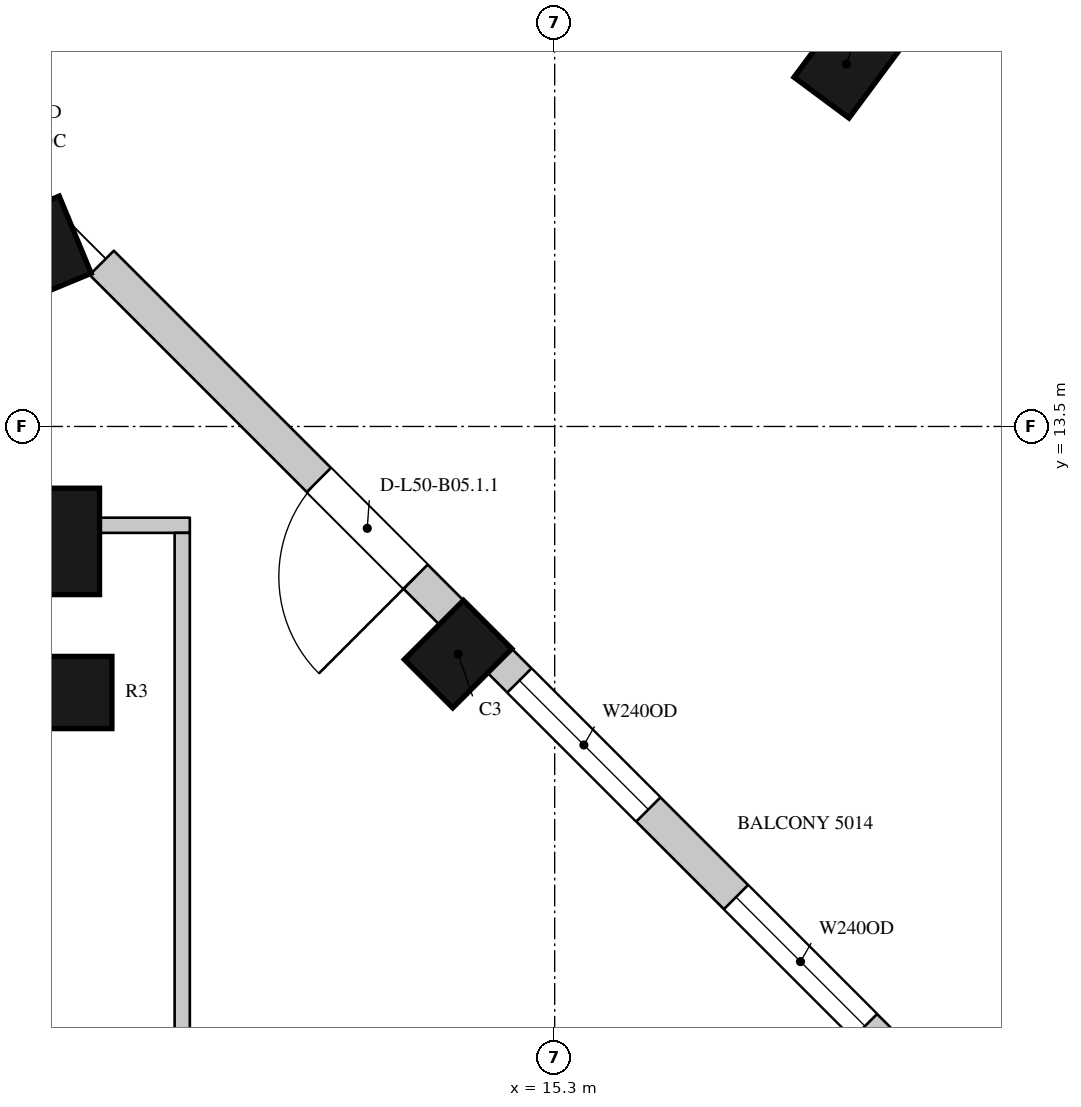
"""IFC4 building model, lengths in metres.
Left out: names, types, materials, properties, quantities, classifications, styles, units other than length and angle.
Written with IfcOpenShell. Run it as: python <this file> out.ifc"""

import sys

from ifc_helpers import new_model, si_unit, direction, frame, frame_2d, origin, origin_2d, place, context, subcontext, project, spatial, rectangle, circle, extrude, element, fill, save


model = new_model("IFC4")
c1 = context("Model", 3, precision=1e-05, world=origin(), true_north=direction((0.0, 1.0)))
c2 = subcontext(c1, "Body", "Model", "MODEL_VIEW")
j1 = project(units=[si_unit("LENGTHUNIT", "METRE"), si_unit("PLANEANGLEUNIT", "RADIAN")], contexts=[c1])
p1 = place(None, origin())
s1 = spatial("IfcSite", under=j1, at=p1, CompositionType="ELEMENT")
p2 = place(p1, origin())
s2 = spatial("IfcBuilding", under=s1, at=p2, CompositionType="ELEMENT")
p3 = place(p2, frame((0.0, 0.0, 226.1)))
s3 = spatial("IfcBuildingStorey", under=s2, at=p3, CompositionType="ELEMENT", Elevation=226.1)
for number, where, z_axis, x_axis in (
    (1, (14.029, 10.505, 0.0), (0.0, 0.0, 1.0), (-0.707, 0.707, 0.0)),
    (2, (8.576, 15.85, 0.0), (0.0, 0.0, 1.0), (-0.924, -0.383, 0.0)),
):
    element("IfcColumn", number, at=place(p3, frame(where, z_axis=z_axis, x_axis=x_axis)), inside=s3, PredefinedType="COLUMN", context=c2, shape_type="SweptSolid", body=[
        extrude(rectangle(XDim=0.9, YDim=1.1, at=origin_2d()), origin(), (0.0, 0.0, 1.0), 4.1),
    ])
p4 = place(p3, frame((8.612, 11.988, 0.0), z_axis=(0.0, 0.0, 1.0), x_axis=(1.0, 0.0, 0.0)))
e3 = element("IfcColumn", 3, at=p4, inside=s3, PredefinedType="COLUMN", context=c2, shape_type="SweptSolid", body=[
    extrude(circle(Radius=0.7, at=origin_2d()), origin(), (0.0, 0.0, 1.0), 4.1),
])
p5 = place(p3, frame((19.138, 18.268, 0.0), z_axis=(0.0, 0.0, 1.0), x_axis=(-0.802798546114, 0.596250362144, 0.0)))
e4 = element("IfcColumn", 4, at=p5, inside=s3, PredefinedType="COLUMN", context=c2, shape_type="SweptSolid", body=[
    extrude(rectangle(XDim=0.9, YDim=1.1, at=origin_2d()), origin(), (0.0, 0.0, 1.0), 4.1),
])
p6 = place(p3, frame((9.0, 10.0, 0.0), z_axis=(0.0, 0.0, 1.0), x_axis=(1.0, 0.0, 0.0)))
e5 = element("IfcColumn", 5, at=p6, inside=s3, PredefinedType="COLUMN", context=c2, shape_type="SweptSolid", body=[
    extrude(circle(Radius=0.475, at=origin_2d()), origin(), (0.0, 0.0, 1.0), 4.1),
])
p7 = place(p3, frame((19.615, 5.379, 0.0), z_axis=(0.0, 0.0, 1.0), x_axis=(-0.707089646058, 0.7071239159, 0.0)))
e6 = element("IfcWall", 6, at=p7, inside=s3, PredefinedType="SOLIDWALL", context=c2, shape_type="SweptSolid", body=[
    extrude(rectangle(XDim=7.124, YDim=0.45, at=frame_2d((3.562, 0.0))), origin(), (0.0, 0.0, 1.0), 3.8),
])
p8 = place(p7, frame((0.328, 0.0, 1.05)))
e7 = element("IfcOpeningElement", 7, at=p8, cuts=e6, PredefinedType="OPENING", context=c2, shape_type="SweptSolid", body=[
    extrude(rectangle(XDim=2.4, YDim=2.4, at=frame_2d((1.2, 1.2))), frame((0.0, 0.235, 0.0), z_axis=(0.0, -1.0, 0.0), x_axis=(1.0, 0.0, 0.0)), (0.0, 0.0, 1.0), 0.47),
])
p9 = place(p7, frame((4.359, 0.0, 1.05)))
e8 = element("IfcOpeningElement", 8, at=p9, cuts=e6, PredefinedType="OPENING", context=c2, shape_type="SweptSolid", body=[
    extrude(rectangle(XDim=2.4, YDim=2.4, at=frame_2d((1.2, 1.2))), frame((0.0, 0.235, 0.0), z_axis=(0.0, -1.0, 0.0), x_axis=(1.0, 0.0, 0.0)), (0.0, 0.0, 1.0), 0.47),
])
p10 = place(p3, frame((13.941, 11.053, 0.0), z_axis=(0.0, 0.0, 1.0), x_axis=(-0.707106781187, 0.707106781187, 0.0)))
e9 = element("IfcWall", 9, at=p10, inside=s3, PredefinedType="SOLIDWALL", context=c2, shape_type="SweptSolid", body=[
    extrude(rectangle(XDim=6.505, YDim=0.45, at=frame_2d((3.252, 0.0))), origin(), (0.0, 0.0, 1.0), 3.8),
])
p11 = place(p10, frame((0.665, 0.0, 0.0)))
e10 = element("IfcOpeningElement", 10, at=p11, cuts=e9, PredefinedType="OPENING", context=c2, shape_type="SweptSolid", body=[
    extrude(rectangle(XDim=1.8, YDim=2.4, at=frame_2d((0.9, 1.2))), frame((0.0, 0.235, 0.0), z_axis=(0.0, -1.0, 0.0), x_axis=(1.0, 0.0, 0.0)), (0.0, 0.0, 1.0), 0.47),
])
p12 = place(p3, frame((12.251, 14.263, 0.0), z_axis=(0.0, 0.0, 1.0), x_axis=(-0.707039709166, 0.707173846846, 0.0)))
e11 = element("IfcWall", 11, at=p12, inside=s3, PredefinedType="SOLIDWALL", context=c2, shape_type="SweptSolid", body=[
    extrude(rectangle(XDim=1.82, YDim=0.45, at=frame_2d((0.91, 0.0))), origin(), (0.0, 0.0, 1.0), 0.6),
])
p13 = place(p3, frame((9.296, 12.2, 0.0), z_axis=(0.0, 0.0, 1.0), x_axis=(1.0, 0.0, 0.0)))
e12 = element("IfcWall", 12, at=p13, inside=s3, PredefinedType="PARTITIONING", context=c2, shape_type="SweptSolid", body=[
    extrude(rectangle(XDim=1.204, YDim=0.2, at=frame_2d((0.602, 0.0))), origin(), (0.0, 0.0, 1.0), 3.8),
])
p14 = place(p3, frame((10.4, -11.4, 0.0), z_axis=(0.0, 0.0, 1.0), x_axis=(0.0, 1.0, 0.0)))
e13 = element("IfcWall", 13, at=p14, inside=s3, PredefinedType="PARTITIONING", context=c2, shape_type="SweptSolid", body=[
    extrude(rectangle(XDim=23.5, YDim=0.2, at=frame_2d((11.75, 0.0))), origin(), (0.0, 0.0, 1.0), 3.8),
])
p15 = place(p14, frame((9.25, 0.0, 0.0)))
e14 = element("IfcOpeningElement", 14, at=p15, cuts=e13, PredefinedType="OPENING", context=c2, shape_type="SweptSolid", body=[
    extrude(rectangle(XDim=1.5, YDim=2.4, at=frame_2d((0.75, 1.2))), frame((0.0, 0.11, 0.0), z_axis=(0.0, -1.0, 0.0), x_axis=(1.0, 0.0, 0.0)), (0.0, 0.0, 1.0), 0.22),
])
p16 = place(p14, frame((2.85, 0.0, 0.0)))
e15 = element("IfcOpeningElement", 15, at=p16, cuts=e13, PredefinedType="OPENING", context=c2, shape_type="SweptSolid", body=[
    extrude(rectangle(XDim=1.1, YDim=2.4, at=frame_2d((0.55, 1.2))), frame((0.0, 0.11, 0.0), z_axis=(0.0, -1.0, 0.0), x_axis=(1.0, 0.0, 0.0)), (0.0, 0.0, 1.0), 0.22),
])
p17 = place(p8, origin())
e16 = element("IfcWindow", 16, at=p17, inside=s3, PartitioningType="SINGLE_PANEL", PredefinedType="WINDOW", context=c2, shape_type="SweptSolid", body=[
    extrude(rectangle(XDim=2.4, YDim=2.4, at=frame_2d((1.2, 1.2))), frame((0.0, 0.135, 0.0), z_axis=(0.0, -1.0, 0.0), x_axis=(1.0, 0.0, 0.0)), (0.0, 0.0, 1.0), 0.06),
])
fill(e7, e16)
p18 = place(p9, origin())
e17 = element("IfcWindow", 17, at=p18, inside=s3, PartitioningType="SINGLE_PANEL", PredefinedType="WINDOW", context=c2, shape_type="SweptSolid", body=[
    extrude(rectangle(XDim=2.4, YDim=2.4, at=frame_2d((1.2, 1.2))), frame((0.0, 0.135, 0.0), z_axis=(0.0, -1.0, 0.0), x_axis=(1.0, 0.0, 0.0)), (0.0, 0.0, 1.0), 0.06),
])
fill(e8, e17)
p19 = place(p11, origin())
e18 = element("IfcDoor", 18, at=p19, inside=s3, OperationType="SLIDING_TO_LEFT", PredefinedType="DOOR", context=c2, shape_type="SweptSolid", body=[
    extrude(rectangle(XDim=1.8, YDim=2.4, at=frame_2d((0.9, 1.2))), frame((0.0, 0.13, 0.0), z_axis=(0.0, -1.0, 0.0), x_axis=(1.0, 0.0, 0.0)), (0.0, 0.0, 1.0), 0.05),
])
fill(e10, e18)
save(model, sys.argv[1])
